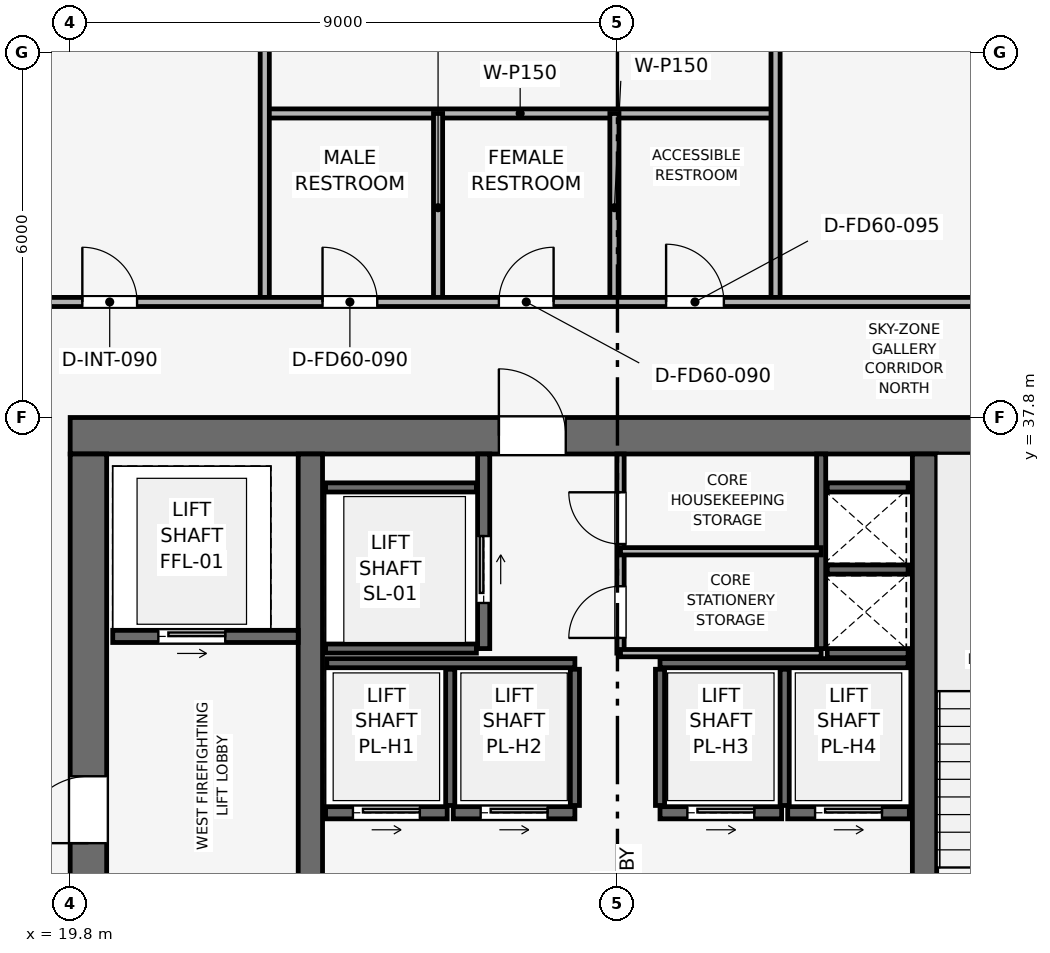
"""IFC4 building model, lengths in metres.
Left out: names, types, materials, properties, quantities, classifications, styles, units other than length and angle.
Written with IfcOpenShell. Run it as: python <this file> out.ifc"""

import sys

from ifc_helpers import new_model, si_unit, direction, frame, frame_2d, origin, place, context, subcontext, project, spatial, rectangle, extrude, element, fill, save


model = new_model("IFC4")
c1 = context("Model", 3, precision=1e-05, world=origin(), true_north=direction((0.0, 1.0)))
c2 = subcontext(c1, "Body", "Model", "MODEL_VIEW")
j1 = project(units=[si_unit("LENGTHUNIT", "METRE"), si_unit("PLANEANGLEUNIT", "RADIAN")], contexts=[c1])
p1 = place(None, origin())
s1 = spatial("IfcSite", under=j1, at=p1, CompositionType="ELEMENT")
p2 = place(p1, origin())
s2 = spatial("IfcBuilding", under=s1, at=p2, CompositionType="ELEMENT")
p3 = place(p2, frame((0.0, 0.0, 318.0)))
s3 = spatial("IfcBuildingStorey", under=s2, at=p3, CompositionType="ELEMENT", Elevation=318.0)
p4 = place(p3, frame((19.8, 37.5, 0.0), z_axis=(0.0, 0.0, 1.0), x_axis=(1.0, 0.0, 0.0)))
e1 = element("IfcWall", 1, at=p4, inside=s3, PredefinedType="SHEAR", context=c2, shape_type="SweptSolid", body=[
    extrude(rectangle(XDim=18.0, YDim=0.6, at=frame_2d((9.0, 0.0))), origin(), (0.0, 0.0, 1.0), 3.75),
])
p5 = place(p4, frame((7.05, 0.0, 0.0)))
e2 = element("IfcOpeningElement", 2, at=p5, cuts=e1, PredefinedType="OPENING", context=c2, shape_type="SweptSolid", body=[
    extrude(rectangle(XDim=1.1, YDim=2.15, at=frame_2d((0.55, 1.075))), frame((0.0, 0.31, 0.0), z_axis=(0.0, -1.0, 0.0), x_axis=(1.0, 0.0, 0.0)), (0.0, 0.0, 1.0), 0.62),
])
p6 = place(p3, frame((20.1, 20.4, 0.0), z_axis=(0.0, 0.0, 1.0), x_axis=(0.0, 1.0, 0.0)))
e3 = element("IfcWall", 3, at=p6, inside=s3, PredefinedType="SHEAR", context=c2, shape_type="SweptSolid", body=[
    extrude(rectangle(XDim=16.8, YDim=0.6, at=frame_2d((8.4, 0.0))), origin(), (0.0, 0.0, 1.0), 3.75),
])
p7 = place(p6, frame((10.4, 0.0, 0.0)))
e4 = element("IfcOpeningElement", 4, at=p7, cuts=e3, PredefinedType="OPENING", context=c2, shape_type="SweptSolid", body=[
    extrude(rectangle(XDim=1.1, YDim=2.15, at=frame_2d((0.55, 1.075))), frame((0.0, 0.31, 0.0), z_axis=(0.0, -1.0, 0.0), x_axis=(1.0, 0.0, 0.0)), (0.0, 0.0, 1.0), 0.62),
])
for number, where, z_axis, x_axis in (
    (5, (23.75, 20.4, 0.0), (0.0, 0.0, 1.0), (0.0, 1.0, 0.0)),
    (6, (33.85, 20.4, 0.0), (0.0, 0.0, 1.0), (0.0, 1.0, 0.0)),
):
    element("IfcWall", number, at=place(p3, frame(where, z_axis=z_axis, x_axis=x_axis)), inside=s3, PredefinedType="SHEAR", context=c2, shape_type="SweptSolid", body=[
        extrude(rectangle(XDim=16.8, YDim=0.4, at=frame_2d((8.4, 0.0))), origin(), (0.0, 0.0, 1.0), 3.75),
    ])
p8 = place(p3, frame((32.15, 34.0, 0.0), z_axis=(0.0, 0.0, 1.0), x_axis=(0.0, 1.0, 0.0)))
e7 = element("IfcWall", 7, at=p8, inside=s3, PredefinedType="SHEAR", context=c2, shape_type="SweptSolid", body=[
    extrude(rectangle(XDim=3.2, YDim=0.15, at=frame_2d((1.6, 0.0))), origin(), (0.0, 0.0, 1.0), 3.51),
])
for number, where, z_axis, x_axis in (
    (8, (32.25, 33.925, 0.0), (0.0, 0.0, 1.0), (1.0, 0.0, 0.0)),
    (9, (32.25, 35.3, 0.0), (0.0, 0.0, 1.0), (1.0, 0.0, 0.0)),
):
    element("IfcWall", number, at=place(p3, frame(where, z_axis=z_axis, x_axis=x_axis)), inside=s3, PredefinedType="SHEAR", context=c2, shape_type="SweptSolid", body=[
        extrude(rectangle(XDim=1.33, YDim=0.15, at=frame_2d((0.665, 0.0))), origin(), (0.0, 0.0, 1.0), 3.51),
    ])
p9 = place(p3, frame((20.5, 34.2, 0.0), z_axis=(0.0, 0.0, 1.0), x_axis=(1.0, 0.0, 0.0)))
e10 = element("IfcWall", 10, at=p9, inside=s3, PredefinedType="SHEAR", context=c2, shape_type="SweptSolid", body=[
    extrude(rectangle(XDim=3.05, YDim=0.2, at=frame_2d((1.525, 0.0))), origin(), (0.0, 0.0, 1.0), 3.51),
])
p10 = place(p9, frame((0.75, 0.0, 0.0)))
e11 = element("IfcOpeningElement", 11, at=p10, cuts=e10, PredefinedType="OPENING", context=c2, shape_type="SweptSolid", body=[
    extrude(rectangle(XDim=1.1, YDim=2.15, at=frame_2d((0.55, 1.075))), frame((0.0, 0.11, 0.0), z_axis=(0.0, -1.0, 0.0), x_axis=(1.0, 0.0, 0.0)), (0.0, 0.0, 1.0), 0.22),
])
p11 = place(p3, frame((26.6, 34.0, 0.0), z_axis=(0.0, 0.0, 1.0), x_axis=(0.0, 1.0, 0.0)))
e12 = element("IfcWall", 12, at=p11, inside=s3, PredefinedType="SHEAR", context=c2, shape_type="SweptSolid", body=[
    extrude(rectangle(XDim=3.2, YDim=0.2, at=frame_2d((1.6, 0.0))), origin(), (0.0, 0.0, 1.0), 3.51),
])
p12 = place(p11, frame((0.75, 0.0, 0.0)))
e13 = element("IfcOpeningElement", 13, at=p12, cuts=e12, PredefinedType="OPENING", context=c2, shape_type="SweptSolid", body=[
    extrude(rectangle(XDim=1.1, YDim=2.15, at=frame_2d((0.55, 1.075))), frame((0.0, 0.11, 0.0), z_axis=(0.0, -1.0, 0.0), x_axis=(1.0, 0.0, 0.0)), (0.0, 0.0, 1.0), 0.22),
])
for number, where, z_axis, x_axis in (
    (14, (24.0, 34.0, 0.0), (0.0, 0.0, 1.0), (1.0, 0.0, 0.0)),
    (15, (24.0, 36.65, 0.0), (0.0, 0.0, 1.0), (1.0, 0.0, 0.0)),
):
    element("IfcWall", number, at=place(p3, frame(where, z_axis=z_axis, x_axis=x_axis)), inside=s3, PredefinedType="SHEAR", context=c2, shape_type="SweptSolid", body=[
        extrude(rectangle(XDim=2.48, YDim=0.15, at=frame_2d((1.24, 0.0))), origin(), (0.0, 0.0, 1.0), 3.51),
    ])
p13 = place(p3, frame((24.0, 31.3, 0.0), z_axis=(0.0, 0.0, 1.0), x_axis=(1.0, 0.0, 0.0)))
e16 = element("IfcWall", 16, at=p13, inside=s3, PredefinedType="SHEAR", context=c2, shape_type="SweptSolid", body=[
    extrude(rectangle(XDim=2.0, YDim=0.2, at=frame_2d((1.0, 0.0))), origin(), (0.0, 0.0, 1.0), 3.51),
])
p14 = place(p13, frame((0.45, 0.0, 0.0)))
e17 = element("IfcOpeningElement", 17, at=p14, cuts=e16, PredefinedType="OPENING", context=c2, shape_type="SweptSolid", body=[
    extrude(rectangle(XDim=1.1, YDim=2.15, at=frame_2d((0.55, 1.075))), frame((0.0, 0.11, 0.0), z_axis=(0.0, -1.0, 0.0), x_axis=(1.0, 0.0, 0.0)), (0.0, 0.0, 1.0), 0.22),
])
p15 = place(p3, frame((26.1, 31.3, 0.0), z_axis=(0.0, 0.0, 1.0), x_axis=(1.0, 0.0, 0.0)))
e18 = element("IfcWall", 18, at=p15, inside=s3, PredefinedType="SHEAR", context=c2, shape_type="SweptSolid", body=[
    extrude(rectangle(XDim=2.0, YDim=0.2, at=frame_2d((1.0, 0.0))), origin(), (0.0, 0.0, 1.0), 3.51),
])
p16 = place(p15, frame((0.45, 0.0, 0.0)))
e19 = element("IfcOpeningElement", 19, at=p16, cuts=e18, PredefinedType="OPENING", context=c2, shape_type="SweptSolid", body=[
    extrude(rectangle(XDim=1.1, YDim=2.15, at=frame_2d((0.55, 1.075))), frame((0.0, 0.11, 0.0), z_axis=(0.0, -1.0, 0.0), x_axis=(1.0, 0.0, 0.0)), (0.0, 0.0, 1.0), 0.22),
])
p17 = place(p3, frame((29.5, 31.3, 0.0), z_axis=(0.0, 0.0, 1.0), x_axis=(1.0, 0.0, 0.0)))
e20 = element("IfcWall", 20, at=p17, inside=s3, PredefinedType="SHEAR", context=c2, shape_type="SweptSolid", body=[
    extrude(rectangle(XDim=2.0, YDim=0.2, at=frame_2d((1.0, 0.0))), origin(), (0.0, 0.0, 1.0), 3.51),
])
p18 = place(p17, frame((0.45, 0.0, 0.0)))
e21 = element("IfcOpeningElement", 21, at=p18, cuts=e20, PredefinedType="OPENING", context=c2, shape_type="SweptSolid", body=[
    extrude(rectangle(XDim=1.1, YDim=2.15, at=frame_2d((0.55, 1.075))), frame((0.0, 0.11, 0.0), z_axis=(0.0, -1.0, 0.0), x_axis=(1.0, 0.0, 0.0)), (0.0, 0.0, 1.0), 0.22),
])
p19 = place(p3, frame((31.6, 31.3, 0.0), z_axis=(0.0, 0.0, 1.0), x_axis=(1.0, 0.0, 0.0)))
e22 = element("IfcWall", 22, at=p19, inside=s3, PredefinedType="SHEAR", context=c2, shape_type="SweptSolid", body=[
    extrude(rectangle(XDim=2.0, YDim=0.2, at=frame_2d((1.0, 0.0))), origin(), (0.0, 0.0, 1.0), 3.51),
])
p20 = place(p19, frame((0.45, 0.0, 0.0)))
e23 = element("IfcOpeningElement", 23, at=p20, cuts=e22, PredefinedType="OPENING", context=c2, shape_type="SweptSolid", body=[
    extrude(rectangle(XDim=1.1, YDim=2.15, at=frame_2d((0.55, 1.075))), frame((0.0, 0.11, 0.0), z_axis=(0.0, -1.0, 0.0), x_axis=(1.0, 0.0, 0.0)), (0.0, 0.0, 1.0), 0.22),
])
p21 = place(p3, frame((32.25, 36.65, 0.0), z_axis=(0.0, 0.0, 1.0), x_axis=(1.0, 0.0, 0.0)))
e24 = element("IfcWall", 24, at=p21, inside=s3, PredefinedType="SHEAR", context=c2, shape_type="SweptSolid", body=[
    extrude(rectangle(XDim=1.33, YDim=0.15, at=frame_2d((0.665, 0.0))), origin(), (0.0, 0.0, 1.0), 3.51),
])
for number, where, z_axis, x_axis in (
    (25, (24.02, 33.76, 0.0), (0.0, 0.0, 1.0), (1.0, 0.0, 0.0)),
    (26, (29.5, 33.76, 0.0), (0.0, 0.0, 1.0), (1.0, 0.0, 0.0)),
):
    element("IfcWall", number, at=place(p3, frame(where, z_axis=z_axis, x_axis=x_axis)), inside=s3, PredefinedType="SHEAR", context=c2, shape_type="SweptSolid", body=[
        extrude(rectangle(XDim=4.08, YDim=0.15, at=frame_2d((2.04, 0.0))), origin(), (0.0, 0.0, 1.0), 3.51),
    ])
for number, where, z_axis, x_axis in (
    (27, (26.05, 31.42, 0.0), (0.0, 0.0, 1.0), (0.0, 1.0, 0.0)),
    (28, (28.1, 31.42, 0.0), (0.0, 0.0, 1.0), (0.0, 1.0, 0.0)),
    (29, (29.5, 31.42, 0.0), (0.0, 0.0, 1.0), (0.0, 1.0, 0.0)),
    (30, (31.55, 31.42, 0.0), (0.0, 0.0, 1.0), (0.0, 1.0, 0.0)),
):
    element("IfcWall", number, at=place(p3, frame(where, z_axis=z_axis, x_axis=x_axis)), inside=s3, PredefinedType="SHEAR", context=c2, shape_type="SweptSolid", body=[
        extrude(rectangle(XDim=2.24, YDim=0.15, at=frame_2d((1.12, 0.0))), origin(), (0.0, 0.0, 1.0), 3.51),
    ])
p22 = place(p3, frame((28.85, 33.925, 0.0), z_axis=(0.0, 0.0, 1.0), x_axis=(0.0, 1.0, 0.0)))
e31 = element("IfcWall", 31, at=p22, inside=s3, PredefinedType="PARTITIONING", context=c2, shape_type="SweptSolid", body=[
    extrude(rectangle(XDim=3.275, YDim=0.12, at=frame_2d((1.637, 0.0))), origin(), (0.0, 0.0, 1.0), 3.51),
])
p23 = place(p22, frame((0.25, 0.0, 0.0)))
e32 = element("IfcOpeningElement", 32, at=p23, cuts=e31, PredefinedType="OPENING", context=c2, shape_type="SweptSolid", body=[
    extrude(rectangle(XDim=0.85, YDim=2.1, at=frame_2d((0.425, 1.05))), frame((0.0, 0.07, 0.0), z_axis=(0.0, -1.0, 0.0), x_axis=(1.0, 0.0, 0.0)), (0.0, 0.0, 1.0), 0.14),
])
p24 = place(p22, frame((1.795, 0.0, 0.0)))
e33 = element("IfcOpeningElement", 33, at=p24, cuts=e31, PredefinedType="OPENING", context=c2, shape_type="SweptSolid", body=[
    extrude(rectangle(XDim=0.85, YDim=2.1, at=frame_2d((0.425, 1.05))), frame((0.0, 0.07, 0.0), z_axis=(0.0, -1.0, 0.0), x_axis=(1.0, 0.0, 0.0)), (0.0, 0.0, 1.0), 0.14),
])
for number, where, z_axis, x_axis in (
    (34, (28.85, 35.6, 0.0), (0.0, 0.0, 1.0), (1.0, 0.0, 0.0)),
    (35, (28.85, 33.925, 0.0), (0.0, 0.0, 1.0), (1.0, 0.0, 0.0)),
):
    element("IfcWall", number, at=place(p3, frame(where, z_axis=z_axis, x_axis=x_axis)), inside=s3, PredefinedType="PARTITIONING", context=c2, shape_type="SweptSolid", body=[
        extrude(rectangle(XDim=3.3, YDim=0.12, at=frame_2d((1.65, 0.0))), origin(), (0.0, 0.0, 1.0), 3.51),
    ])
p25 = place(p3, frame((23.0, 42.8, 0.0), z_axis=(0.0, 0.0, 1.0), x_axis=(1.0, 0.0, 0.0)))
e36 = element("IfcWall", 36, at=p25, inside=s3, PredefinedType="PARTITIONING", context=c2, shape_type="SweptSolid", body=[
    extrude(rectangle(XDim=8.4, YDim=0.15, at=frame_2d((4.2, 0.0))), origin(), (0.0, 0.0, 1.0), 3.095),
])
p26 = place(p3, frame((23.0, 39.7, 0.0), z_axis=(0.0, 0.0, 1.0), x_axis=(0.0, 1.0, 0.0)))
e37 = element("IfcWall", 37, at=p26, inside=s3, PredefinedType="PARTITIONING", context=c2, shape_type="SweptSolid", body=[
    extrude(rectangle(XDim=11.77, YDim=0.15, at=frame_2d((5.885, 0.0))), origin(), (0.0, 0.0, 1.0), 3.135),
])
p27 = place(p26, frame((6.985, 0.0, 0.0)))
e38 = element("IfcOpeningElement", 38, at=p27, cuts=e37, PredefinedType="OPENING", context=c2, shape_type="SweptSolid", body=[
    extrude(rectangle(XDim=0.9, YDim=2.1, at=frame_2d((0.45, 1.05))), frame((0.0, 0.085, 0.0), z_axis=(0.0, -1.0, 0.0), x_axis=(1.0, 0.0, 0.0)), (0.0, 0.0, 1.0), 0.17),
])
p28 = place(p3, frame((31.4, 39.7, 0.0), z_axis=(0.0, 0.0, 1.0), x_axis=(0.0, 1.0, 0.0)))
e39 = element("IfcWall", 39, at=p28, inside=s3, PredefinedType="PARTITIONING", context=c2, shape_type="SweptSolid", body=[
    extrude(rectangle(XDim=11.77, YDim=0.15, at=frame_2d((5.885, 0.0))), origin(), (0.0, 0.0, 1.0), 3.135),
])
p29 = place(p3, frame((25.85, 39.7, 0.0), z_axis=(0.0, 0.0, 1.0), x_axis=(0.0, 1.0, 0.0)))
e40 = element("IfcWall", 40, at=p29, inside=s3, PredefinedType="PARTITIONING", context=c2, shape_type="SweptSolid", body=[
    extrude(rectangle(XDim=3.1, YDim=0.15, at=frame_2d((1.55, 0.0))), origin(), (0.0, 0.0, 1.0), 3.135),
])
p30 = place(p3, frame((28.75, 39.7, 0.0), z_axis=(0.0, 0.0, 1.0), x_axis=(0.0, 1.0, 0.0)))
e41 = element("IfcWall", 41, at=p30, inside=s3, PredefinedType="PARTITIONING", context=c2, shape_type="SweptSolid", body=[
    extrude(rectangle(XDim=3.1, YDim=0.15, at=frame_2d((1.55, 0.0))), origin(), (0.0, 0.0, 1.0), 3.095),
])
p31 = place(p3, frame((17.9, 39.7, 0.0), z_axis=(0.0, 0.0, 1.0), x_axis=(1.0, 0.0, 0.0)))
e42 = element("IfcWall", 42, at=p31, inside=s3, PredefinedType="PARTITIONING", context=c2, shape_type="SweptSolid", body=[
    extrude(rectangle(XDim=21.8, YDim=0.15, at=frame_2d((10.9, 0.0))), origin(), (0.0, 0.0, 1.0), 3.095),
])
p32 = place(p31, frame((2.1, 0.0, 0.0)))
e43 = element("IfcOpeningElement", 43, at=p32, cuts=e42, PredefinedType="OPENING", context=c2, shape_type="SweptSolid", body=[
    extrude(rectangle(XDim=0.9, YDim=2.1, at=frame_2d((0.45, 1.05))), frame((0.0, 0.085, 0.0), z_axis=(0.0, -1.0, 0.0), x_axis=(1.0, 0.0, 0.0)), (0.0, 0.0, 1.0), 0.17),
])
p33 = place(p31, frame((6.05, 0.0, 0.0)))
e44 = element("IfcOpeningElement", 44, at=p33, cuts=e42, PredefinedType="OPENING", context=c2, shape_type="SweptSolid", body=[
    extrude(rectangle(XDim=0.9, YDim=2.1, at=frame_2d((0.45, 1.05))), frame((0.0, 0.085, 0.0), z_axis=(0.0, -1.0, 0.0), x_axis=(1.0, 0.0, 0.0)), (0.0, 0.0, 1.0), 0.17),
])
p34 = place(p31, frame((8.95, 0.0, 0.0)))
e45 = element("IfcOpeningElement", 45, at=p34, cuts=e42, PredefinedType="OPENING", context=c2, shape_type="SweptSolid", body=[
    extrude(rectangle(XDim=0.9, YDim=2.1, at=frame_2d((0.45, 1.05))), frame((0.0, 0.085, 0.0), z_axis=(0.0, -1.0, 0.0), x_axis=(1.0, 0.0, 0.0)), (0.0, 0.0, 1.0), 0.17),
])
p35 = place(p31, frame((11.7, 0.0, 0.0)))
e46 = element("IfcOpeningElement", 46, at=p35, cuts=e42, PredefinedType="OPENING", context=c2, shape_type="SweptSolid", body=[
    extrude(rectangle(XDim=0.95, YDim=2.1, at=frame_2d((0.475, 1.05))), frame((0.0, 0.085, 0.0), z_axis=(0.0, -1.0, 0.0), x_axis=(1.0, 0.0, 0.0)), (0.0, 0.0, 1.0), 0.17),
])
p36 = place(p31, frame((17.2, 0.0, 0.0)))
e47 = element("IfcOpeningElement", 47, at=p36, cuts=e42, PredefinedType="OPENING", context=c2, shape_type="SweptSolid", body=[
    extrude(rectangle(XDim=0.9, YDim=2.1, at=frame_2d((0.45, 1.05))), frame((0.0, 0.085, 0.0), z_axis=(0.0, -1.0, 0.0), x_axis=(1.0, 0.0, 0.0)), (0.0, 0.0, 1.0), 0.17),
])
p37 = place(p10, origin())
e48 = element("IfcDoor", 48, at=p37, inside=s3, OperationType="SLIDING_TO_RIGHT", PredefinedType="DOOR", context=c2, shape_type="SweptSolid", body=[
    extrude(rectangle(XDim=1.1, YDim=2.15, at=frame_2d((0.55, 1.075))), frame((0.0, 0.025, 0.0), z_axis=(0.0, -1.0, 0.0), x_axis=(1.0, 0.0, 0.0)), (0.0, 0.0, 1.0), 0.05),
])
fill(e11, e48)
p38 = place(p12, origin())
e49 = element("IfcDoor", 49, at=p38, inside=s3, OperationType="SLIDING_TO_RIGHT", PredefinedType="DOOR", context=c2, shape_type="SweptSolid", body=[
    extrude(rectangle(XDim=1.1, YDim=2.15, at=frame_2d((0.55, 1.075))), frame((0.0, 0.025, 0.0), z_axis=(0.0, -1.0, 0.0), x_axis=(1.0, 0.0, 0.0)), (0.0, 0.0, 1.0), 0.05),
])
fill(e13, e49)
p39 = place(p14, origin())
e50 = element("IfcDoor", 50, at=p39, inside=s3, OperationType="SLIDING_TO_RIGHT", PredefinedType="DOOR", context=c2, shape_type="SweptSolid", body=[
    extrude(rectangle(XDim=1.1, YDim=2.15, at=frame_2d((0.55, 1.075))), frame((0.0, 0.025, 0.0), z_axis=(0.0, -1.0, 0.0), x_axis=(1.0, 0.0, 0.0)), (0.0, 0.0, 1.0), 0.05),
])
fill(e17, e50)
p40 = place(p16, origin())
e51 = element("IfcDoor", 51, at=p40, inside=s3, OperationType="SLIDING_TO_RIGHT", PredefinedType="DOOR", context=c2, shape_type="SweptSolid", body=[
    extrude(rectangle(XDim=1.1, YDim=2.15, at=frame_2d((0.55, 1.075))), frame((0.0, 0.025, 0.0), z_axis=(0.0, -1.0, 0.0), x_axis=(1.0, 0.0, 0.0)), (0.0, 0.0, 1.0), 0.05),
])
fill(e19, e51)
p41 = place(p18, origin())
e52 = element("IfcDoor", 52, at=p41, inside=s3, OperationType="SLIDING_TO_RIGHT", PredefinedType="DOOR", context=c2, shape_type="SweptSolid", body=[
    extrude(rectangle(XDim=1.1, YDim=2.15, at=frame_2d((0.55, 1.075))), frame((0.0, 0.025, 0.0), z_axis=(0.0, -1.0, 0.0), x_axis=(1.0, 0.0, 0.0)), (0.0, 0.0, 1.0), 0.05),
])
fill(e21, e52)
p42 = place(p20, origin())
e53 = element("IfcDoor", 53, at=p42, inside=s3, OperationType="SLIDING_TO_RIGHT", PredefinedType="DOOR", context=c2, shape_type="SweptSolid", body=[
    extrude(rectangle(XDim=1.1, YDim=2.15, at=frame_2d((0.55, 1.075))), frame((0.0, 0.025, 0.0), z_axis=(0.0, -1.0, 0.0), x_axis=(1.0, 0.0, 0.0)), (0.0, 0.0, 1.0), 0.05),
])
fill(e23, e53)
p43 = place(p23, origin())
e54 = element("IfcDoor", 54, at=p43, inside=s3, OperationType="SINGLE_SWING_LEFT", PredefinedType="DOOR", context=c2, shape_type="SweptSolid", body=[
    extrude(rectangle(XDim=0.85, YDim=2.1, at=frame_2d((0.425, 1.05))), frame((0.0, 0.025, 0.0), z_axis=(0.0, -1.0, 0.0), x_axis=(1.0, 0.0, 0.0)), (0.0, 0.0, 1.0), 0.05),
])
fill(e32, e54)
p44 = place(p24, origin())
e55 = element("IfcDoor", 55, at=p44, inside=s3, OperationType="SINGLE_SWING_RIGHT", PredefinedType="DOOR", context=c2, shape_type="SweptSolid", body=[
    extrude(rectangle(XDim=0.85, YDim=2.1, at=frame_2d((0.425, 1.05))), frame((0.0, 0.025, 0.0), z_axis=(0.0, -1.0, 0.0), x_axis=(1.0, 0.0, 0.0)), (0.0, 0.0, 1.0), 0.05),
])
fill(e33, e55)
p45 = place(p32, origin())
e56 = element("IfcDoor", 56, at=p45, inside=s3, OperationType="SINGLE_SWING_LEFT", PredefinedType="DOOR", context=c2, shape_type="SweptSolid", body=[
    extrude(rectangle(XDim=0.9, YDim=2.1, at=frame_2d((0.45, 1.05))), frame((0.0, 0.025, 0.0), z_axis=(0.0, -1.0, 0.0), x_axis=(1.0, 0.0, 0.0)), (0.0, 0.0, 1.0), 0.05),
])
fill(e43, e56)
p46 = place(p33, origin())
e57 = element("IfcDoor", 57, at=p46, inside=s3, OperationType="SINGLE_SWING_LEFT", PredefinedType="DOOR", context=c2, shape_type="SweptSolid", body=[
    extrude(rectangle(XDim=0.9, YDim=2.1, at=frame_2d((0.45, 1.05))), frame((0.0, 0.025, 0.0), z_axis=(0.0, -1.0, 0.0), x_axis=(1.0, 0.0, 0.0)), (0.0, 0.0, 1.0), 0.05),
])
fill(e44, e57)
p47 = place(p34, origin())
e58 = element("IfcDoor", 58, at=p47, inside=s3, OperationType="SINGLE_SWING_RIGHT", PredefinedType="DOOR", context=c2, shape_type="SweptSolid", body=[
    extrude(rectangle(XDim=0.9, YDim=2.1, at=frame_2d((0.45, 1.05))), frame((0.0, 0.025, 0.0), z_axis=(0.0, -1.0, 0.0), x_axis=(1.0, 0.0, 0.0)), (0.0, 0.0, 1.0), 0.05),
])
fill(e45, e58)
p48 = place(p35, origin())
e59 = element("IfcDoor", 59, at=p48, inside=s3, OperationType="SINGLE_SWING_LEFT", PredefinedType="DOOR", context=c2, shape_type="SweptSolid", body=[
    extrude(rectangle(XDim=0.95, YDim=2.1, at=frame_2d((0.475, 1.05))), frame((0.0, 0.025, 0.0), z_axis=(0.0, -1.0, 0.0), x_axis=(1.0, 0.0, 0.0)), (0.0, 0.0, 1.0), 0.05),
])
fill(e46, e59)
p49 = place(p7, origin())
e60 = element("IfcDoor", 60, at=p49, inside=s3, OperationType="SINGLE_SWING_LEFT", PredefinedType="DOOR", context=c2, shape_type="SweptSolid", body=[
    extrude(rectangle(XDim=1.1, YDim=2.15, at=frame_2d((0.55, 1.075))), frame((0.0, 0.025, 0.0), z_axis=(0.0, -1.0, 0.0), x_axis=(1.0, 0.0, 0.0)), (0.0, 0.0, 1.0), 0.05),
])
fill(e4, e60)
p50 = place(p5, origin())
e61 = element("IfcDoor", 61, at=p50, inside=s3, OperationType="SINGLE_SWING_LEFT", PredefinedType="DOOR", context=c2, shape_type="SweptSolid", body=[
    extrude(rectangle(XDim=1.1, YDim=2.15, at=frame_2d((0.55, 1.075))), frame((0.0, 0.025, 0.0), z_axis=(0.0, -1.0, 0.0), x_axis=(1.0, 0.0, 0.0)), (0.0, 0.0, 1.0), 0.05),
])
fill(e2, e61)
save(model, sys.argv[1])
